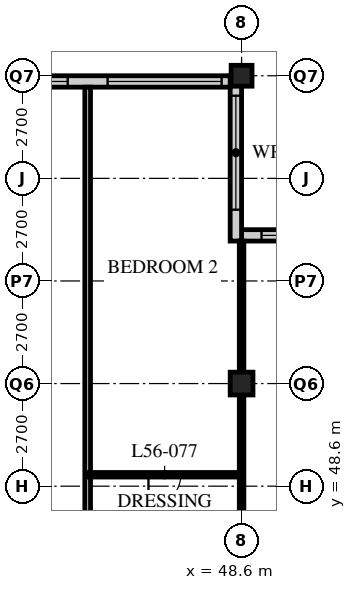
"""IFC4 building model, lengths in metres.
Left out: names, types, materials, properties, quantities, classifications, styles, units other than length and angle.
Written with IfcOpenShell. Run it as: python <this file> out.ifc"""

import sys

from ifc_helpers import new_model, si_unit, direction, frame, frame_2d, origin, origin_2d, place, context, subcontext, project, spatial, rectangle, hollow_rectangle, extrude, element, fill, save


model = new_model("IFC4")
c1 = context("Model", 3, precision=1e-05, world=origin(), true_north=direction((0.0, 1.0)))
c2 = subcontext(c1, "Body", "Model", "MODEL_VIEW")
j1 = project(units=[si_unit("LENGTHUNIT", "METRE"), si_unit("PLANEANGLEUNIT", "RADIAN")], contexts=[c1])
p1 = place(None, origin())
s1 = spatial("IfcSite", under=j1, at=p1, CompositionType="ELEMENT")
p2 = place(p1, origin())
s2 = spatial("IfcBuilding", under=s1, at=p2, CompositionType="ELEMENT")
p3 = place(p2, frame((0.0, 0.0, 217.2)))
s3 = spatial("IfcBuildingStorey", under=s2, at=p3, CompositionType="ELEMENT", Elevation=217.2)
p4 = place(p3, frame((48.6, 51.3, 0.0), z_axis=(0.0, 0.0, 1.0), x_axis=(1.0, 0.0, 0.0)))
e1 = element("IfcColumn", 1, at=p4, inside=s3, PredefinedType="COLUMN", context=c2, shape_type="SweptSolid", body=[
    extrude(hollow_rectangle(XDim=0.6, YDim=0.6, WallThickness=0.05, at=origin_2d()), origin(), (0.0, 0.0, 1.0), 3.6),
])
p5 = place(p3, frame((48.6, 59.4, 0.0), z_axis=(0.0, 0.0, 1.0), x_axis=(1.0, 0.0, 0.0)))
e2 = element("IfcColumn", 2, at=p5, inside=s3, PredefinedType="COLUMN", context=c2, shape_type="SweptSolid", body=[
    extrude(hollow_rectangle(XDim=0.55, YDim=0.55, WallThickness=0.045, at=origin_2d()), origin(), (0.0, 0.0, 1.0), 3.6),
])
p6 = place(p3, frame((52.35, 55.2, 0.0), z_axis=(0.0, 0.0, 1.0), x_axis=(-1.0, 0.0, 0.0)))
e3 = element("IfcWall", 3, at=p6, inside=s3, PredefinedType="SOLIDWALL", context=c2, shape_type="SweptSolid", body=[
    extrude(rectangle(XDim=3.75, YDim=0.3, at=frame_2d((1.875, 0.0))), origin(), (0.0, 0.0, 1.0), 3.39),
])
p7 = place(p6, frame((0.225, 0.0, 0.6)))
e4 = element("IfcOpeningElement", 4, at=p7, cuts=e3, PredefinedType="OPENING", context=c2, shape_type="SweptSolid", body=[
    extrude(rectangle(XDim=3.0, YDim=2.0, at=frame_2d((1.5, 1.0))), frame((0.0, 0.16, 0.0), z_axis=(0.0, -1.0, 0.0), x_axis=(1.0, 0.0, 0.0)), (0.0, 0.0, 1.0), 0.32),
])
p8 = place(p3, frame((48.45, 55.05, 0.0), z_axis=(0.0, 0.0, 1.0), x_axis=(0.0, 1.0, 0.0)))
e5 = element("IfcWall", 5, at=p8, inside=s3, PredefinedType="SOLIDWALL", context=c2, shape_type="SweptSolid", body=[
    extrude(rectangle(XDim=4.35, YDim=0.3, at=frame_2d((2.175, 0.0))), origin(), (0.0, 0.0, 1.0), 3.39),
])
p9 = place(p8, frame((0.825, 0.0, 0.6)))
e6 = element("IfcOpeningElement", 6, at=p9, cuts=e5, PredefinedType="OPENING", context=c2, shape_type="SweptSolid", body=[
    extrude(rectangle(XDim=3.0, YDim=2.0, at=frame_2d((1.5, 1.0))), frame((0.0, 0.16, 0.0), z_axis=(0.0, -1.0, 0.0), x_axis=(1.0, 0.0, 0.0)), (0.0, 0.0, 1.0), 0.32),
])
p10 = place(p3, frame((48.3, 59.25, 0.0), z_axis=(0.0, 0.0, 1.0), x_axis=(-1.0, 0.0, 0.0)))
e7 = element("IfcWall", 7, at=p10, inside=s3, PredefinedType="SOLIDWALL", context=c2, shape_type="SweptSolid", body=[
    extrude(rectangle(XDim=40.2, YDim=0.3, at=frame_2d((20.1, 0.0))), origin(), (0.0, 0.0, 1.0), 3.39),
])
p11 = place(p10, frame((0.225, 0.0, 0.6)))
e8 = element("IfcOpeningElement", 8, at=p11, cuts=e7, PredefinedType="OPENING", context=c2, shape_type="SweptSolid", body=[
    extrude(rectangle(XDim=3.0, YDim=2.4, at=frame_2d((1.5, 1.2))), frame((0.0, 0.16, 0.0), z_axis=(0.0, -1.0, 0.0), x_axis=(1.0, 0.0, 0.0)), (0.0, 0.0, 1.0), 0.32),
])
p12 = place(p10, frame((4.275, 0.0, 0.6)))
e9 = element("IfcOpeningElement", 9, at=p12, cuts=e7, PredefinedType="OPENING", context=c2, shape_type="SweptSolid", body=[
    extrude(rectangle(XDim=3.0, YDim=2.4, at=frame_2d((1.5, 1.2))), frame((0.0, 0.16, 0.0), z_axis=(0.0, -1.0, 0.0), x_axis=(1.0, 0.0, 0.0)), (0.0, 0.0, 1.0), 0.32),
])
p13 = place(p10, frame((8.325, 0.0, 0.6)))
e10 = element("IfcOpeningElement", 10, at=p13, cuts=e7, PredefinedType="OPENING", context=c2, shape_type="SweptSolid", body=[
    extrude(rectangle(XDim=3.0, YDim=2.4, at=frame_2d((1.5, 1.2))), frame((0.0, 0.16, 0.0), z_axis=(0.0, -1.0, 0.0), x_axis=(1.0, 0.0, 0.0)), (0.0, 0.0, 1.0), 0.32),
])
p14 = place(p10, frame((12.375, 0.0, 0.6)))
e11 = element("IfcOpeningElement", 11, at=p14, cuts=e7, PredefinedType="OPENING", context=c2, shape_type="SweptSolid", body=[
    extrude(rectangle(XDim=3.0, YDim=2.4, at=frame_2d((1.5, 1.2))), frame((0.0, 0.16, 0.0), z_axis=(0.0, -1.0, 0.0), x_axis=(1.0, 0.0, 0.0)), (0.0, 0.0, 1.0), 0.32),
])
p15 = place(p10, frame((16.425, 0.0, 0.6)))
e12 = element("IfcOpeningElement", 12, at=p15, cuts=e7, PredefinedType="OPENING", context=c2, shape_type="SweptSolid", body=[
    extrude(rectangle(XDim=3.0, YDim=2.4, at=frame_2d((1.5, 1.2))), frame((0.0, 0.16, 0.0), z_axis=(0.0, -1.0, 0.0), x_axis=(1.0, 0.0, 0.0)), (0.0, 0.0, 1.0), 0.32),
])
p16 = place(p10, frame((20.475, 0.0, 0.6)))
e13 = element("IfcOpeningElement", 13, at=p16, cuts=e7, PredefinedType="OPENING", context=c2, shape_type="SweptSolid", body=[
    extrude(rectangle(XDim=3.0, YDim=2.4, at=frame_2d((1.5, 1.2))), frame((0.0, 0.16, 0.0), z_axis=(0.0, -1.0, 0.0), x_axis=(1.0, 0.0, 0.0)), (0.0, 0.0, 1.0), 0.32),
])
p17 = place(p10, frame((24.525, 0.0, 0.6)))
e14 = element("IfcOpeningElement", 14, at=p17, cuts=e7, PredefinedType="OPENING", context=c2, shape_type="SweptSolid", body=[
    extrude(rectangle(XDim=3.0, YDim=2.4, at=frame_2d((1.5, 1.2))), frame((0.0, 0.16, 0.0), z_axis=(0.0, -1.0, 0.0), x_axis=(1.0, 0.0, 0.0)), (0.0, 0.0, 1.0), 0.32),
])
p18 = place(p10, frame((28.575, 0.0, 0.6)))
e15 = element("IfcOpeningElement", 15, at=p18, cuts=e7, PredefinedType="OPENING", context=c2, shape_type="SweptSolid", body=[
    extrude(rectangle(XDim=3.0, YDim=2.4, at=frame_2d((1.5, 1.2))), frame((0.0, 0.16, 0.0), z_axis=(0.0, -1.0, 0.0), x_axis=(1.0, 0.0, 0.0)), (0.0, 0.0, 1.0), 0.32),
])
p19 = place(p10, frame((32.625, 0.0, 0.6)))
e16 = element("IfcOpeningElement", 16, at=p19, cuts=e7, PredefinedType="OPENING", context=c2, shape_type="SweptSolid", body=[
    extrude(rectangle(XDim=3.0, YDim=2.4, at=frame_2d((1.5, 1.2))), frame((0.0, 0.16, 0.0), z_axis=(0.0, -1.0, 0.0), x_axis=(1.0, 0.0, 0.0)), (0.0, 0.0, 1.0), 0.32),
])
p20 = place(p10, frame((36.675, 0.0, 0.6)))
e17 = element("IfcOpeningElement", 17, at=p20, cuts=e7, PredefinedType="OPENING", context=c2, shape_type="SweptSolid", body=[
    extrude(rectangle(XDim=3.0, YDim=2.4, at=frame_2d((1.5, 1.2))), frame((0.0, 0.16, 0.0), z_axis=(0.0, -1.0, 0.0), x_axis=(1.0, 0.0, 0.0)), (0.0, 0.0, 1.0), 0.32),
])
p21 = place(p3, frame((48.6, 45.6, 0.0), z_axis=(0.0, 0.0, 1.0), x_axis=(0.0, 1.0, 0.0)))
e18 = element("IfcWall", 18, at=p21, inside=s3, PredefinedType="PARTITIONING", context=c2, shape_type="SweptSolid", body=[
    extrude(rectangle(XDim=9.45, YDim=0.12, at=frame_2d((4.725, 0.0))), origin(), (0.0, 0.0, 1.0), 2.778),
])
p22 = place(p3, frame((44.55, 43.2, 0.0), z_axis=(0.0, 0.0, 1.0), x_axis=(0.0, 1.0, 0.0)))
e19 = element("IfcWall", 19, at=p22, inside=s3, PredefinedType="PARTITIONING", context=c2, shape_type="SweptSolid", body=[
    extrude(rectangle(XDim=15.9, YDim=0.15, at=frame_2d((7.95, 0.0))), origin(), (0.0, 0.0, 1.0), 3.39),
])
p23 = place(p3, frame((44.55, 48.9, 0.0), z_axis=(0.0, 0.0, 1.0), x_axis=(1.0, 0.0, 0.0)))
e20 = element("IfcWall", 20, at=p23, inside=s3, PredefinedType="PARTITIONING", context=c2, shape_type="SweptSolid", body=[
    extrude(rectangle(XDim=4.05, YDim=0.12, at=frame_2d((2.025, 0.0))), origin(), (0.0, 0.0, 1.0), 3.39),
])
p24 = place(p23, frame((1.6, 0.0, 0.0)))
e21 = element("IfcOpeningElement", 21, at=p24, cuts=e20, PredefinedType="OPENING", context=c2, shape_type="SweptSolid", body=[
    extrude(rectangle(XDim=0.85, YDim=2.1, at=frame_2d((0.425, 1.05))), frame((0.0, 0.07, 0.0), z_axis=(0.0, -1.0, 0.0), x_axis=(1.0, 0.0, 0.0)), (0.0, 0.0, 1.0), 0.14),
])
p25 = place(p7, origin())
e22 = element("IfcWindow", 22, at=p25, inside=s3, PartitioningType="SINGLE_PANEL", PredefinedType="WINDOW", context=c2, shape_type="SweptSolid", body=[
    extrude(rectangle(XDim=3.0, YDim=2.0, at=frame_2d((1.5, 1.0))), frame((0.0, 0.03, 0.0), z_axis=(0.0, -1.0, 0.0), x_axis=(1.0, 0.0, 0.0)), (0.0, 0.0, 1.0), 0.06),
])
fill(e4, e22)
p26 = place(p9, origin())
e23 = element("IfcWindow", 23, at=p26, inside=s3, PartitioningType="SINGLE_PANEL", PredefinedType="WINDOW", context=c2, shape_type="SweptSolid", body=[
    extrude(rectangle(XDim=3.0, YDim=2.0, at=frame_2d((1.5, 1.0))), frame((0.0, 0.03, 0.0), z_axis=(0.0, -1.0, 0.0), x_axis=(1.0, 0.0, 0.0)), (0.0, 0.0, 1.0), 0.06),
])
fill(e6, e23)
p27 = place(p11, origin())
e24 = element("IfcWindow", 24, at=p27, inside=s3, PartitioningType="SINGLE_PANEL", PredefinedType="WINDOW", context=c2, shape_type="SweptSolid", body=[
    extrude(rectangle(XDim=3.0, YDim=2.4, at=frame_2d((1.5, 1.2))), frame((0.0, 0.03, 0.0), z_axis=(0.0, -1.0, 0.0), x_axis=(1.0, 0.0, 0.0)), (0.0, 0.0, 1.0), 0.06),
])
fill(e8, e24)
p28 = place(p12, origin())
e25 = element("IfcWindow", 25, at=p28, inside=s3, PartitioningType="SINGLE_PANEL", PredefinedType="WINDOW", context=c2, shape_type="SweptSolid", body=[
    extrude(rectangle(XDim=3.0, YDim=2.4, at=frame_2d((1.5, 1.2))), frame((0.0, 0.03, 0.0), z_axis=(0.0, -1.0, 0.0), x_axis=(1.0, 0.0, 0.0)), (0.0, 0.0, 1.0), 0.06),
])
fill(e9, e25)
p29 = place(p24, origin())
e26 = element("IfcDoor", 26, at=p29, inside=s3, OperationType="SINGLE_SWING_RIGHT", PredefinedType="DOOR", context=c2, shape_type="SweptSolid", body=[
    extrude(rectangle(XDim=0.85, YDim=2.1, at=frame_2d((0.425, 1.05))), frame((0.0, 0.025, 0.0), z_axis=(0.0, -1.0, 0.0), x_axis=(1.0, 0.0, 0.0)), (0.0, 0.0, 1.0), 0.05),
])
fill(e21, e26)
save(model, sys.argv[1])
